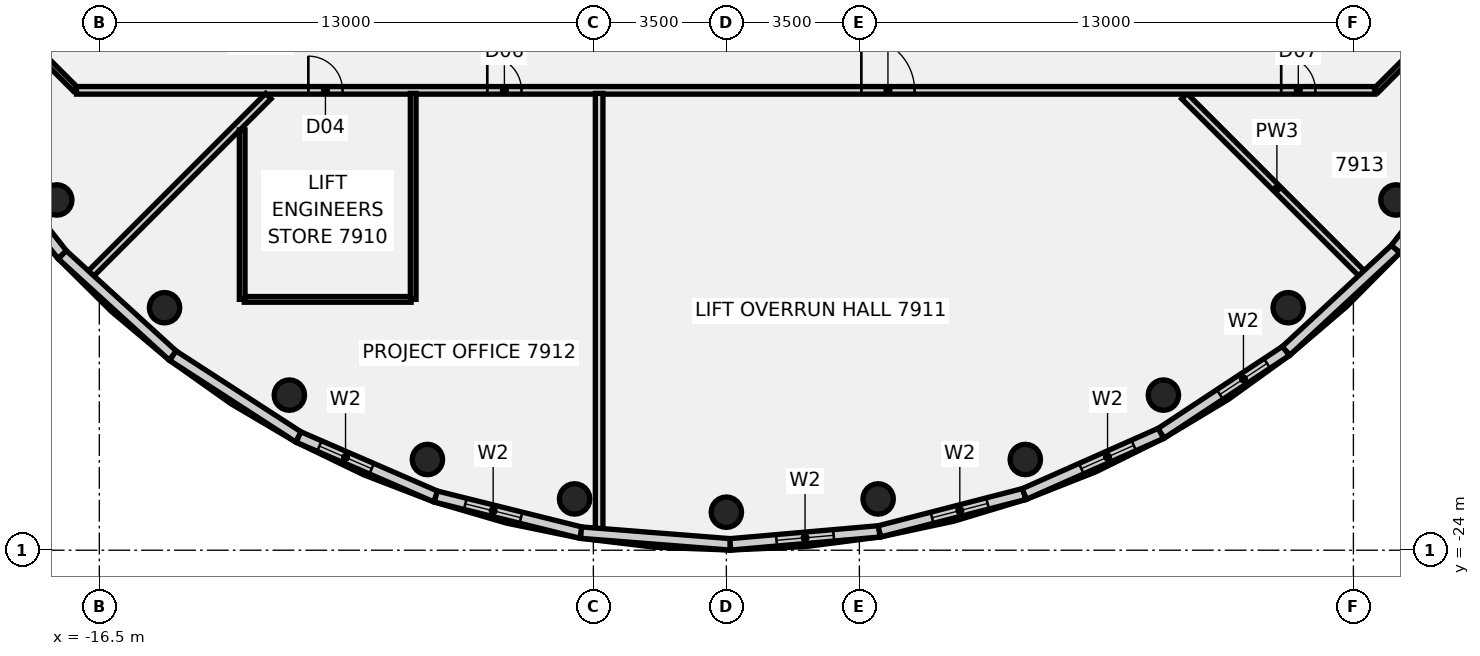
"""IFC4 building model, lengths in metres.
Left out: names, types, materials, properties, quantities, classifications, styles, units other than length and angle.
Written with IfcOpenShell. Run it as: python <this file> out.ifc"""

import sys

from ifc_helpers import new_model, si_unit, direction, frame, frame_2d, origin, origin_2d, place, context, subcontext, project, spatial, rectangle, circle, extrude, element, fill, save


model = new_model("IFC4")
c1 = context("Model", 3, precision=1e-05, world=origin(), true_north=direction((0.0, 1.0)))
c2 = subcontext(c1, "Body", "Model", "MODEL_VIEW")
j1 = project(units=[si_unit("LENGTHUNIT", "METRE"), si_unit("PLANEANGLEUNIT", "RADIAN")], contexts=[c1])
p1 = place(None, origin())
s1 = spatial("IfcSite", under=j1, at=p1, CompositionType="ELEMENT")
p2 = place(p1, origin())
s2 = spatial("IfcBuilding", under=s1, at=p2, CompositionType="ELEMENT")
p3 = place(p2, frame((0.0, 0.0, 321.4)))
s3 = spatial("IfcBuildingStorey", under=s2, at=p3, CompositionType="ELEMENT", Elevation=321.4)
for number, where, z_axis, x_axis in (
    (1, (-17.619, -14.784, -0.18), (0.0, 0.0, 1.0), (1.0, 0.0, 0.0)),
    (2, (-14.784, -17.619, -0.18), (0.0, 0.0, 1.0), (1.0, 0.0, 0.0)),
    (3, (-11.5, -19.919, -0.18), (0.0, 0.0, 1.0), (1.0, 0.0, 0.0)),
    (4, (-7.866, -21.613, -0.18), (0.0, 0.0, 1.0), (1.0, 0.0, 0.0)),
    (5, (-3.994, -22.651, -0.18), (0.0, 0.0, 1.0), (1.0, 0.0, 0.0)),
    (6, (0.0, -23.0, -0.18), (0.0, 0.0, 1.0), (1.0, 0.0, 0.0)),
    (7, (3.994, -22.651, -0.18), (0.0, 0.0, 1.0), (1.0, 0.0, 0.0)),
    (8, (7.866, -21.613, -0.18), (0.0, 0.0, 1.0), (1.0, 0.0, 0.0)),
    (9, (11.5, -19.919, -0.18), (0.0, 0.0, 1.0), (1.0, 0.0, 0.0)),
    (10, (14.784, -17.619, -0.18), (0.0, 0.0, 1.0), (1.0, 0.0, 0.0)),
    (11, (17.619, -14.784, -0.18), (0.0, 0.0, 1.0), (1.0, 0.0, 0.0)),
):
    element("IfcColumn", number, at=place(p3, frame(where, z_axis=z_axis, x_axis=x_axis)), inside=s3, PredefinedType="COLUMN", context=c2, shape_type="SweptSolid", body=[
        extrude(circle(Radius=0.4, at=origin_2d()), origin(), (0.0, 0.0, 1.0), 4.0),
    ])
p4 = place(p3, frame((-18.872, -10.128, 0.0), z_axis=(0.0, 0.0, 1.0), x_axis=(0.707106781187, -0.707106781187, 0.0)))
e12 = element("IfcWall", 12, at=p4, inside=s3, PredefinedType="PARTITIONING", context=c2, shape_type="SweptSolid", body=[
    extrude(rectangle(XDim=2.455, YDim=0.15, at=frame_2d((1.228, 0.0))), origin(), (0.0, 0.0, 1.0), 3.22),
])
p5 = place(p3, frame((12.052, -12.052, 0.0), z_axis=(0.0, 0.0, 1.0), x_axis=(0.707106781187, -0.707106781187, 0.0)))
e13 = element("IfcWall", 13, at=p5, inside=s3, PredefinedType="PARTITIONING", context=c2, shape_type="SweptSolid", body=[
    extrude(rectangle(XDim=6.886, YDim=0.2, at=frame_2d((3.443, 0.0))), origin(), (0.0, 0.0, 1.0), 3.22),
])
p6 = place(p3, frame((-17.1, -11.9, 0.0), z_axis=(0.0, 0.0, 1.0), x_axis=(1.0, 0.0, 0.0)))
e14 = element("IfcWall", 14, at=p6, inside=s3, PredefinedType="PARTITIONING", context=c2, shape_type="SweptSolid", body=[
    extrude(rectangle(XDim=34.165, YDim=0.2, at=frame_2d((17.083, 0.0))), origin(), (0.0, 0.0, 1.0), 3.22),
])
p7 = place(p6, frame((6.1, 0.0, 0.0)))
e15 = element("IfcOpeningElement", 15, at=p7, cuts=e14, PredefinedType="OPENING", context=c2, shape_type="SweptSolid", body=[
    extrude(rectangle(XDim=0.9, YDim=2.1, at=frame_2d((0.45, 1.05))), frame((0.0, 0.11, 0.0), z_axis=(0.0, -1.0, 0.0), x_axis=(1.0, 0.0, 0.0)), (0.0, 0.0, 1.0), 0.22),
])
p8 = place(p6, frame((20.652, 0.0, 0.0)))
e16 = element("IfcOpeningElement", 16, at=p8, cuts=e14, PredefinedType="OPENING", context=c2, shape_type="SweptSolid", body=[
    extrude(rectangle(XDim=1.4, YDim=2.1, at=frame_2d((0.7, 1.05))), frame((0.0, 0.11, 0.0), z_axis=(0.0, -1.0, 0.0), x_axis=(1.0, 0.0, 0.0)), (0.0, 0.0, 1.0), 0.22),
])
p9 = place(p6, frame((10.809, 0.0, 0.0)))
e17 = element("IfcOpeningElement", 17, at=p9, cuts=e14, PredefinedType="OPENING", context=c2, shape_type="SweptSolid", body=[
    extrude(rectangle(XDim=0.9, YDim=2.1, at=frame_2d((0.45, 1.05))), frame((0.0, 0.11, 0.0), z_axis=(0.0, -1.0, 0.0), x_axis=(1.0, 0.0, 0.0)), (0.0, 0.0, 1.0), 0.22),
])
p10 = place(p6, frame((31.7, 0.0, 0.0)))
e18 = element("IfcOpeningElement", 18, at=p10, cuts=e14, PredefinedType="OPENING", context=c2, shape_type="SweptSolid", body=[
    extrude(rectangle(XDim=0.9, YDim=2.1, at=frame_2d((0.45, 1.05))), frame((0.0, 0.11, 0.0), z_axis=(0.0, -1.0, 0.0), x_axis=(1.0, 0.0, 0.0)), (0.0, 0.0, 1.0), 0.22),
])
p11 = place(p3, frame((-12.686, -17.4, 0.0), z_axis=(0.0, 0.0, 1.0), x_axis=(1.0, 0.0, 0.0)))
e19 = element("IfcWall", 19, at=p11, inside=s3, PredefinedType="PARTITIONING", context=c2, shape_type="SweptSolid", body=[
    extrude(rectangle(XDim=4.39, YDim=0.15, at=frame_2d((2.195, 0.0))), origin(), (0.0, 0.0, 1.0), 3.22),
])
p12 = place(p3, frame((-16.927, -16.927, 0.0), z_axis=(0.0, 0.0, 1.0), x_axis=(0.707106781187, 0.707106781187, 0.0)))
e20 = element("IfcWall", 20, at=p12, inside=s3, PredefinedType="PARTITIONING", context=c2, shape_type="SweptSolid", body=[
    extrude(rectangle(XDim=6.894, YDim=0.2, at=frame_2d((3.447, 0.0))), origin(), (0.0, 0.0, 1.0), 3.22),
])
p13 = place(p3, frame((17.1, -11.9, 0.0), z_axis=(0.0, 0.0, 1.0), x_axis=(0.707106781187, 0.707106781187, 0.0)))
e21 = element("IfcWall", 21, at=p13, inside=s3, PredefinedType="PARTITIONING", context=c2, shape_type="SweptSolid", body=[
    extrude(rectangle(XDim=2.505, YDim=0.15, at=frame_2d((1.253, 0.0))), origin(), (0.0, 0.0, 1.0), 3.22),
])
p14 = place(p3, frame((-12.741, -17.4, 0.0), z_axis=(0.0, 0.0, 1.0), x_axis=(0.0, 1.0, 0.0)))
e22 = element("IfcWall", 22, at=p14, inside=s3, PredefinedType="PARTITIONING", context=c2, shape_type="SweptSolid", body=[
    extrude(rectangle(XDim=4.459, YDim=0.15, at=frame_2d((2.229, 0.0))), origin(), (0.0, 0.0, 1.0), 3.22),
])
p15 = place(p3, frame((-8.241, -17.4, 0.0), z_axis=(0.0, 0.0, 1.0), x_axis=(0.0, 1.0, 0.0)))
e23 = element("IfcWall", 23, at=p15, inside=s3, PredefinedType="PARTITIONING", context=c2, shape_type="SweptSolid", body=[
    extrude(rectangle(XDim=5.42, YDim=0.15, at=frame_2d((2.71, 0.0))), origin(), (0.0, 0.0, 1.0), 3.22),
])
p16 = place(p3, frame((-3.348, -23.724, 0.0), z_axis=(0.0, 0.0, 1.0), x_axis=(0.0, 1.0, 0.0)))
e24 = element("IfcWall", 24, at=p16, inside=s3, PredefinedType="PARTITIONING", context=c2, shape_type="SweptSolid", body=[
    extrude(rectangle(XDim=11.744, YDim=0.2, at=frame_2d((5.872, 0.0))), origin(), (0.0, 0.0, 1.0), 3.22),
])
p17 = place(p3, frame((-19.906, -13.128, 0.0), z_axis=(0.0, 0.0, 1.0), x_axis=(0.617577851206, -0.786509756901, 0.0)))
e25 = element("IfcWall", 25, at=p17, inside=s3, PredefinedType="SOLIDWALL", context=c2, shape_type="SweptSolid", body=[
    extrude(rectangle(XDim=3.938, YDim=0.3, at=frame_2d((1.969, 0.0))), origin(), (0.0, 0.0, 1.0), 3.82),
])
p18 = place(p3, frame((-17.474, -16.226, 0.0), z_axis=(0.0, 0.0, 1.0), x_axis=(0.738634435884, -0.674106200926, 0.0)))
e26 = element("IfcWall", 26, at=p18, inside=s3, PredefinedType="SOLIDWALL", context=c2, shape_type="SweptSolid", body=[
    extrude(rectangle(XDim=3.938, YDim=0.3, at=frame_2d((1.969, 0.0))), origin(), (0.0, 0.0, 1.0), 3.82),
])
p19 = place(p3, frame((-14.565, -18.881, 0.0), z_axis=(0.0, 0.0, 1.0), x_axis=(0.839498632024, -0.54336180104, 0.0)))
e27 = element("IfcWall", 27, at=p19, inside=s3, PredefinedType="SOLIDWALL", context=c2, shape_type="SweptSolid", body=[
    extrude(rectangle(XDim=3.938, YDim=0.3, at=frame_2d((1.969, 0.0))), origin(), (0.0, 0.0, 1.0), 3.82),
])
p20 = place(p3, frame((-11.259, -21.021, 0.0), z_axis=(0.0, 0.0, 1.0), x_axis=(0.917505110173, -0.397723990735, 0.0)))
e28 = element("IfcWall", 28, at=p20, inside=s3, PredefinedType="SOLIDWALL", context=c2, shape_type="SweptSolid", body=[
    extrude(rectangle(XDim=3.938, YDim=0.3, at=frame_2d((1.969, 0.0))), origin(), (0.0, 0.0, 1.0), 3.82),
])
p21 = place(p20, frame((0.6, 0.0, 1.4)))
e29 = element("IfcOpeningElement", 29, at=p21, cuts=e28, PredefinedType="OPENING", context=c2, shape_type="SweptSolid", body=[
    extrude(rectangle(XDim=1.498, YDim=2.12, at=frame_2d((0.749, 1.06))), frame((0.0, 0.16, 0.0), z_axis=(0.0, -1.0, 0.0), x_axis=(1.0, 0.0, 0.0)), (0.0, 0.0, 1.0), 0.32),
])
p22 = place(p3, frame((-7.646, -22.587, 0.0), z_axis=(0.0, 0.0, 1.0), x_axis=(0.970440788586, -0.241339337547, 0.0)))
e30 = element("IfcWall", 30, at=p22, inside=s3, PredefinedType="SOLIDWALL", context=c2, shape_type="SweptSolid", body=[
    extrude(rectangle(XDim=3.938, YDim=0.3, at=frame_2d((1.969, 0.0))), origin(), (0.0, 0.0, 1.0), 3.82),
])
p23 = place(p22, frame((0.801, 0.0, 1.4)))
e31 = element("IfcOpeningElement", 31, at=p23, cuts=e30, PredefinedType="OPENING", context=c2, shape_type="SweptSolid", body=[
    extrude(rectangle(XDim=1.509, YDim=2.12, at=frame_2d((0.754, 1.06))), frame((0.0, 0.16, 0.0), z_axis=(0.0, -1.0, 0.0), x_axis=(1.0, 0.0, 0.0)), (0.0, 0.0, 1.0), 0.32),
])
p24 = place(p3, frame((-3.824, -23.537, 0.0), z_axis=(0.0, 0.0, 1.0), x_axis=(0.996930318741, -0.078293930641, 0.0)))
e32 = element("IfcWall", 32, at=p24, inside=s3, PredefinedType="SOLIDWALL", context=c2, shape_type="SweptSolid", body=[
    extrude(rectangle(XDim=3.938, YDim=0.3, at=frame_2d((1.969, 0.0))), origin(), (0.0, 0.0, 1.0), 3.82),
])
p25 = place(p3, frame((0.103, -23.846, 0.0), z_axis=(0.0, 0.0, 1.0), x_axis=(0.99621635874, 0.08690780505, 0.0)))
e33 = element("IfcWall", 33, at=p25, inside=s3, PredefinedType="SOLIDWALL", context=c2, shape_type="SweptSolid", body=[
    extrude(rectangle(XDim=3.938, YDim=0.3, at=frame_2d((1.969, 0.0))), origin(), (0.0, 0.0, 1.0), 3.82),
])
p26 = place(p25, frame((1.221, 0.0, 1.4)))
e34 = element("IfcOpeningElement", 34, at=p26, cuts=e33, PredefinedType="OPENING", context=c2, shape_type="SweptSolid", body=[
    extrude(rectangle(XDim=1.509, YDim=2.12, at=frame_2d((0.755, 1.06))), frame((0.0, 0.16, 0.0), z_axis=(0.0, -1.0, 0.0), x_axis=(1.0, 0.0, 0.0)), (0.0, 0.0, 1.0), 0.32),
])
p27 = place(p3, frame((4.026, -23.503, 0.0), z_axis=(0.0, 0.0, 1.0), x_axis=(0.968336809904, 0.24964739651, 0.0)))
e35 = element("IfcWall", 35, at=p27, inside=s3, PredefinedType="SOLIDWALL", context=c2, shape_type="SweptSolid", body=[
    extrude(rectangle(XDim=3.938, YDim=0.3, at=frame_2d((1.969, 0.0))), origin(), (0.0, 0.0, 1.0), 3.82),
])
p28 = place(p27, frame((1.432, 0.0, 1.4)))
e36 = element("IfcOpeningElement", 36, at=p28, cuts=e35, PredefinedType="OPENING", context=c2, shape_type="SweptSolid", body=[
    extrude(rectangle(XDim=1.509, YDim=2.12, at=frame_2d((0.754, 1.06))), frame((0.0, 0.16, 0.0), z_axis=(0.0, -1.0, 0.0), x_axis=(1.0, 0.0, 0.0)), (0.0, 0.0, 1.0), 0.32),
])
p29 = place(p3, frame((7.84, -22.52, 0.0), z_axis=(0.0, 0.0, 1.0), x_axis=(0.91404912862, 0.405603489221, 0.0)))
e37 = element("IfcWall", 37, at=p29, inside=s3, PredefinedType="SOLIDWALL", context=c2, shape_type="SweptSolid", body=[
    extrude(rectangle(XDim=3.938, YDim=0.3, at=frame_2d((1.969, 0.0))), origin(), (0.0, 0.0, 1.0), 3.82),
])
p30 = place(p29, frame((1.643, 0.0, 1.4)))
e38 = element("IfcOpeningElement", 38, at=p30, cuts=e37, PredefinedType="OPENING", context=c2, shape_type="SweptSolid", body=[
    extrude(rectangle(XDim=1.509, YDim=2.12, at=frame_2d((0.754, 1.06))), frame((0.0, 0.16, 0.0), z_axis=(0.0, -1.0, 0.0), x_axis=(1.0, 0.0, 0.0)), (0.0, 0.0, 1.0), 0.32),
])
p31 = place(p3, frame((11.439, -20.923, 0.0), z_axis=(0.0, 0.0, 1.0), x_axis=(0.834786621205, 0.550573607302, 0.0)))
e39 = element("IfcWall", 39, at=p31, inside=s3, PredefinedType="SOLIDWALL", context=c2, shape_type="SweptSolid", body=[
    extrude(rectangle(XDim=3.938, YDim=0.3, at=frame_2d((1.969, 0.0))), origin(), (0.0, 0.0, 1.0), 3.82),
])
p32 = place(p31, frame((1.853, 0.0, 1.4)))
e40 = element("IfcOpeningElement", 40, at=p32, cuts=e39, PredefinedType="OPENING", context=c2, shape_type="SweptSolid", body=[
    extrude(rectangle(XDim=1.485, YDim=2.12, at=frame_2d((0.743, 1.06))), frame((0.0, 0.16, 0.0), z_axis=(0.0, -1.0, 0.0), x_axis=(1.0, 0.0, 0.0)), (0.0, 0.0, 1.0), 0.32),
])
p33 = place(p3, frame((14.727, -18.754, 0.0), z_axis=(0.0, 0.0, 1.0), x_axis=(0.732813362883, 0.680429698926, 0.0)))
e41 = element("IfcWall", 41, at=p33, inside=s3, PredefinedType="SOLIDWALL", context=c2, shape_type="SweptSolid", body=[
    extrude(rectangle(XDim=3.938, YDim=0.3, at=frame_2d((1.969, 0.0))), origin(), (0.0, 0.0, 1.0), 3.82),
])
p34 = place(p3, frame((17.613, -16.075, 0.0), z_axis=(0.0, 0.0, 1.0), x_axis=(0.610785688376, 0.79179596038, 0.0)))
e42 = element("IfcWall", 42, at=p34, inside=s3, PredefinedType="SOLIDWALL", context=c2, shape_type="SweptSolid", body=[
    extrude(rectangle(XDim=3.938, YDim=0.3, at=frame_2d((1.969, 0.0))), origin(), (0.0, 0.0, 1.0), 3.82),
])
p35 = place(p7, frame((0.9, 0.0, 0.0), z_axis=(0.0, 0.0, 1.0), x_axis=(-1.0, 0.0, 0.0)))
e43 = element("IfcDoor", 43, at=p35, inside=s3, OperationType="SINGLE_SWING_LEFT", PredefinedType="DOOR", context=c2, shape_type="SweptSolid", body=[
    extrude(rectangle(XDim=0.9, YDim=2.1, at=frame_2d((0.45, 1.05))), frame((0.0, 0.025, 0.0), z_axis=(0.0, -1.0, 0.0), x_axis=(1.0, 0.0, 0.0)), (0.0, 0.0, 1.0), 0.05),
])
fill(e15, e43)
p36 = place(p8, frame((1.4, 0.0, 0.0), z_axis=(0.0, 0.0, 1.0), x_axis=(-1.0, 0.0, 0.0)))
e44 = element("IfcDoor", 44, at=p36, inside=s3, OperationType="DOUBLE_DOOR_SINGLE_SWING", PredefinedType="DOOR", context=c2, shape_type="SweptSolid", body=[
    extrude(rectangle(XDim=1.4, YDim=2.1, at=frame_2d((0.7, 1.05))), frame((0.0, 0.025, 0.0), z_axis=(0.0, -1.0, 0.0), x_axis=(1.0, 0.0, 0.0)), (0.0, 0.0, 1.0), 0.05),
])
fill(e16, e44)
p37 = place(p9, frame((0.9, 0.0, 0.0), z_axis=(0.0, 0.0, 1.0), x_axis=(-1.0, 0.0, 0.0)))
e45 = element("IfcDoor", 45, at=p37, inside=s3, OperationType="SINGLE_SWING_LEFT", PredefinedType="DOOR", context=c2, shape_type="SweptSolid", body=[
    extrude(rectangle(XDim=0.9, YDim=2.1, at=frame_2d((0.45, 1.05))), frame((0.0, 0.025, 0.0), z_axis=(0.0, -1.0, 0.0), x_axis=(1.0, 0.0, 0.0)), (0.0, 0.0, 1.0), 0.05),
])
fill(e17, e45)
p38 = place(p10, frame((0.9, 0.0, 0.0), z_axis=(0.0, 0.0, 1.0), x_axis=(-1.0, 0.0, 0.0)))
e46 = element("IfcDoor", 46, at=p38, inside=s3, OperationType="SINGLE_SWING_RIGHT", PredefinedType="DOOR", context=c2, shape_type="SweptSolid", body=[
    extrude(rectangle(XDim=0.9, YDim=2.1, at=frame_2d((0.45, 1.05))), frame((0.0, 0.025, 0.0), z_axis=(0.0, -1.0, 0.0), x_axis=(1.0, 0.0, 0.0)), (0.0, 0.0, 1.0), 0.05),
])
fill(e18, e46)
p39 = place(p21, origin())
e47 = element("IfcWindow", 47, at=p39, inside=s3, PartitioningType="SINGLE_PANEL", PredefinedType="WINDOW", context=c2, shape_type="SweptSolid", body=[
    extrude(rectangle(XDim=1.498, YDim=2.12, at=frame_2d((0.749, 1.06))), frame((0.0, 0.03, 0.0), z_axis=(0.0, -1.0, 0.0), x_axis=(1.0, 0.0, 0.0)), (0.0, 0.0, 1.0), 0.06),
])
fill(e29, e47)
p40 = place(p23, origin())
e48 = element("IfcWindow", 48, at=p40, inside=s3, PartitioningType="SINGLE_PANEL", PredefinedType="WINDOW", context=c2, shape_type="SweptSolid", body=[
    extrude(rectangle(XDim=1.509, YDim=2.12, at=frame_2d((0.754, 1.06))), frame((0.0, 0.03, 0.0), z_axis=(0.0, -1.0, 0.0), x_axis=(1.0, 0.0, 0.0)), (0.0, 0.0, 1.0), 0.06),
])
fill(e31, e48)
p41 = place(p26, origin())
e49 = element("IfcWindow", 49, at=p41, inside=s3, PartitioningType="SINGLE_PANEL", PredefinedType="WINDOW", context=c2, shape_type="SweptSolid", body=[
    extrude(rectangle(XDim=1.509, YDim=2.12, at=frame_2d((0.755, 1.06))), frame((0.0, 0.03, 0.0), z_axis=(0.0, -1.0, 0.0), x_axis=(1.0, 0.0, 0.0)), (0.0, 0.0, 1.0), 0.06),
])
fill(e34, e49)
p42 = place(p28, origin())
e50 = element("IfcWindow", 50, at=p42, inside=s3, PartitioningType="SINGLE_PANEL", PredefinedType="WINDOW", context=c2, shape_type="SweptSolid", body=[
    extrude(rectangle(XDim=1.509, YDim=2.12, at=frame_2d((0.754, 1.06))), frame((0.0, 0.03, 0.0), z_axis=(0.0, -1.0, 0.0), x_axis=(1.0, 0.0, 0.0)), (0.0, 0.0, 1.0), 0.06),
])
fill(e36, e50)
p43 = place(p30, origin())
e51 = element("IfcWindow", 51, at=p43, inside=s3, PartitioningType="SINGLE_PANEL", PredefinedType="WINDOW", context=c2, shape_type="SweptSolid", body=[
    extrude(rectangle(XDim=1.509, YDim=2.12, at=frame_2d((0.754, 1.06))), frame((0.0, 0.03, 0.0), z_axis=(0.0, -1.0, 0.0), x_axis=(1.0, 0.0, 0.0)), (0.0, 0.0, 1.0), 0.06),
])
fill(e38, e51)
p44 = place(p32, origin())
e52 = element("IfcWindow", 52, at=p44, inside=s3, PartitioningType="SINGLE_PANEL", PredefinedType="WINDOW", context=c2, shape_type="SweptSolid", body=[
    extrude(rectangle(XDim=1.485, YDim=2.12, at=frame_2d((0.743, 1.06))), frame((0.0, 0.03, 0.0), z_axis=(0.0, -1.0, 0.0), x_axis=(1.0, 0.0, 0.0)), (0.0, 0.0, 1.0), 0.06),
])
fill(e40, e52)
save(model, sys.argv[1])
